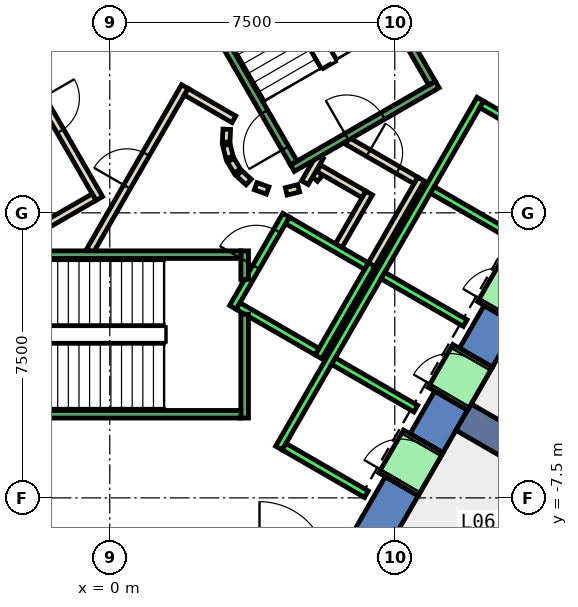
"""IFC4 building model, lengths in metres.
Left out: names, types, materials, properties, quantities, classifications, styles, units other than length and angle.
Written with IfcOpenShell. Run it as: python <this file> out.ifc"""

import sys

from ifc_helpers import new_model, si_unit, direction, frame, frame_2d, origin, place, context, subcontext, project, spatial, polyline, rectangle, outline, extrude, element, fill, save


model = new_model("IFC4")
c1 = context("Model", 3, precision=1e-05, world=origin(), true_north=direction((0.0, 1.0)))
c2 = subcontext(c1, "Body", "Model", "MODEL_VIEW")
j1 = project(units=[si_unit("LENGTHUNIT", "METRE"), si_unit("PLANEANGLEUNIT", "RADIAN")], contexts=[c1])
p1 = place(None, origin())
s1 = spatial("IfcSite", under=j1, at=p1, CompositionType="ELEMENT")
p2 = place(p1, origin())
s2 = spatial("IfcBuilding", under=s1, at=p2, CompositionType="ELEMENT")
p3 = place(p2, frame((0.0, 0.0, 35.0)))
s3 = spatial("IfcBuildingStorey", under=s2, at=p3, CompositionType="ELEMENT", Elevation=35.0)
p4 = place(p3, frame((0.0, 0.0, -0.6)))
e1 = element("IfcWall", 1, at=p4, inside=s3, PredefinedType="SHEAR", context=c2, shape_type="SweptSolid", body=[
    extrude(outline(polyline([(8.517, 11.748), (7.651, 11.248), (12.702, 2.5), (13.856, 2.5), (8.517, 11.748)])), origin(), (0.0, 0.0, 1.0), 4.4),
])
p5 = place(p3, frame((0.0, 0.0, -0.6)))
e2 = element("IfcWall", 2, at=p5, inside=s3, PredefinedType="SHEAR", context=c2, shape_type="SweptSolid", body=[
    extrude(outline(polyline([(8.117, -7.44), (7.252, -6.94), (6.351, -8.5), (6.928, -9.5), (8.117, -7.44)])), origin(), (0.0, 0.0, 1.0), 4.4),
])
p6 = place(p3, frame((0.0, 0.0, -0.6)))
e3 = element("IfcWall", 3, at=p6, inside=s3, PredefinedType="SHEAR", context=c2, shape_type="SweptSolid", body=[
    extrude(outline(polyline([(9.417, -5.189), (8.551, -4.689), (7.902, -5.814), (8.767, -6.314), (9.417, -5.189)])), origin(), (0.0, 0.0, 1.0), 4.4),
])
p7 = place(p3, frame((0.0, 0.0, -0.6)))
e4 = element("IfcWall", 4, at=p7, inside=s3, PredefinedType="SHEAR", context=c2, shape_type="SweptSolid", body=[
    extrude(outline(polyline([(10.717, -2.937), (9.851, -2.437), (9.201, -3.563), (10.067, -4.063), (10.717, -2.937)])), origin(), (0.0, 0.0, 1.0), 4.4),
])
p8 = place(p3, frame((0.0, 0.0, 3.6)))
e5 = element("IfcWall", 5, at=p8, inside=s3, PredefinedType="SHEAR", context=c2, shape_type="SweptSolid", body=[
    extrude(outline(polyline([(8.767, -6.314), (7.902, -5.814), (7.252, -6.94), (8.117, -7.44), (8.767, -6.314)])), origin(), (0.0, 0.0, 1.0), 0.2),
])
p9 = place(p3, frame((0.0, 0.0, 3.6)))
e6 = element("IfcWall", 6, at=p9, inside=s3, PredefinedType="SHEAR", context=c2, shape_type="SweptSolid", body=[
    extrude(outline(polyline([(10.067, -4.063), (9.201, -3.563), (8.551, -4.689), (9.417, -5.189), (10.067, -4.063)])), origin(), (0.0, 0.0, 1.0), 0.2),
])
p10 = place(p3, frame((0.0, 0.0, 3.6)))
e7 = element("IfcWall", 7, at=p10, inside=s3, PredefinedType="SHEAR", context=c2, shape_type="SweptSolid", body=[
    extrude(outline(polyline([(11.367, -1.811), (10.501, -1.311), (9.851, -2.437), (10.717, -2.937), (11.367, -1.811)])), origin(), (0.0, 0.0, 1.0), 0.2),
])
p11 = place(p3, frame((9.31, -5.375, -0.6), z_axis=(0.0, 0.0, 1.0), x_axis=(0.866017533419, -0.500013631625, 0.0)))
e8 = element("IfcWall", 8, at=p11, inside=s3, PredefinedType="SHEAR", context=c2, shape_type="SweptSolid", body=[
    extrude(rectangle(XDim=9.0, YDim=0.8, at=frame_2d((4.5, 0.0))), origin(), (0.0, 0.0, 1.0), 4.4),
])
p12 = place(p3, frame((5.39, 0.898, 0.0), z_axis=(0.0, 0.0, 1.0), x_axis=(0.673828488714, 0.738887791073, 0.0)))
e9 = element("IfcWall", 9, at=p12, inside=s3, PredefinedType="PARTITIONING", context=c2, shape_type="SweptSolid", body=[
    extrude(rectangle(XDim=0.263, YDim=0.2, at=frame_2d((0.131, 0.0))), origin(), (0.0, 0.0, 1.0), 3.8),
])
p13 = place(p3, frame((5.499, 1.172, 0.0), z_axis=(0.0, 0.0, 1.0), x_axis=(0.866333505267, -0.499465972466, 0.0)))
e10 = element("IfcWall", 10, at=p13, inside=s3, PredefinedType="PARTITIONING", context=c2, shape_type="SweptSolid", body=[
    extrude(rectangle(XDim=1.374, YDim=0.2, at=frame_2d((0.687, 0.0))), origin(), (0.0, 0.0, 1.0), 3.8),
])
p14 = place(p3, frame((6.826, 0.522, 0.0), z_axis=(0.0, 0.0, 1.0), x_axis=(-0.500016722714, -0.866015748706, 0.0)))
e11 = element("IfcWall", 11, at=p14, inside=s3, PredefinedType="PARTITIONING", context=c2, shape_type="SweptSolid", body=[
    extrude(rectangle(XDim=1.7, YDim=0.2, at=frame_2d((0.85, 0.0))), origin(), (0.0, 0.0, 1.0), 3.8),
])
p15 = place(p3, frame((6.25, 1.894, 0.0), z_axis=(0.0, 0.0, 1.0), x_axis=(0.866043184279, -0.499969202016, 0.0)))
e12 = element("IfcWall", 12, at=p15, inside=s3, PredefinedType="PARTITIONING", context=c2, shape_type="SweptSolid", body=[
    extrude(rectangle(XDim=2.084, YDim=0.2, at=frame_2d((1.042, 0.0))), origin(), (0.0, 0.0, 1.0), 3.8),
])
p16 = place(p15, frame((0.642, 0.0, 0.0)))
e13 = element("IfcOpeningElement", 13, at=p16, cuts=e12, PredefinedType="OPENING", context=c2, shape_type="SweptSolid", body=[
    extrude(rectangle(XDim=0.9, YDim=2.1, at=frame_2d((0.45, 1.05))), frame((0.0, 0.11, 0.0), z_axis=(0.0, -1.0, 0.0), x_axis=(1.0, 0.0, 0.0)), (0.0, 0.0, 1.0), 0.22),
])
p17 = place(p3, frame((8.192, 0.888, 0.0), z_axis=(0.0, 0.0, 1.0), x_axis=(-0.499940625693, -0.866059680843, 0.0)))
e14 = element("IfcWall", 14, at=p17, inside=s3, PredefinedType="PARTITIONING", context=c2, shape_type="SweptSolid", body=[
    extrude(rectangle(XDim=2.68, YDim=0.2, at=frame_2d((1.34, 0.0))), origin(), (0.0, 0.0, 1.0), 3.8),
])
p18 = place(p3, frame((5.135, 0.793, 0.0), z_axis=(0.0, 0.0, 1.0), x_axis=(0.499526442893, 0.866298639529, 0.0)))
e15 = element("IfcWall", 15, at=p18, inside=s3, PredefinedType="PARTITIONING", context=c2, shape_type="SweptSolid", body=[
    extrude(rectangle(XDim=0.791, YDim=0.2, at=frame_2d((0.396, 0.0))), origin(), (0.0, 0.0, 1.0), 3.8),
])
p19 = place(p3, frame((-0.52, -1.0, 0.0), z_axis=(0.0, 0.0, 1.0), x_axis=(0.50011622646, 0.865958290007, 0.0)))
e16 = element("IfcWall", 16, at=p19, inside=s3, PredefinedType="PARTITIONING", context=c2, shape_type="SweptSolid", body=[
    extrude(rectangle(XDim=4.991, YDim=0.2, at=frame_2d((2.496, 0.0))), origin(), (0.0, 0.0, 1.0), 3.8),
])
p20 = place(p19, frame((1.945, 0.0, 0.0)))
e17 = element("IfcOpeningElement", 17, at=p20, cuts=e16, PredefinedType="OPENING", context=c2, shape_type="SweptSolid", body=[
    extrude(rectangle(XDim=1.0, YDim=2.1, at=frame_2d((0.5, 1.05))), frame((0.0, 0.11, 0.0), z_axis=(0.0, -1.0, 0.0), x_axis=(1.0, 0.0, 0.0)), (0.0, 0.0, 1.0), 0.22),
])
p21 = place(p3, frame((2.012, 3.186, 0.0), z_axis=(0.0, 0.0, 1.0), x_axis=(0.865891012941, -0.500232699559, 0.0)))
e18 = element("IfcWall", 18, at=p21, inside=s3, PredefinedType="PARTITIONING", context=c2, shape_type="SweptSolid", body=[
    extrude(rectangle(XDim=1.449, YDim=0.2, at=frame_2d((0.725, 0.0))), origin(), (0.0, 0.0, 1.0), 3.8),
])
p22 = place(p3, frame((3.079, 2.199, 0.0), z_axis=(0.0, 0.0, 1.0), x_axis=(-0.047771483479, -0.998858290933, 0.0)))
e19 = element("IfcWall", 19, at=p22, inside=s3, PredefinedType="PARTITIONING", context=c2, shape_type="SweptSolid", body=[
    extrude(rectangle(XDim=0.337, YDim=0.2, at=frame_2d((0.169, 0.0))), origin(), (0.0, 0.0, 1.0), 3.8),
])
p23 = place(p3, frame((3.07, 1.786, 0.0), z_axis=(0.0, 0.0, 1.0), x_axis=(0.242705583207, -0.970099994784, 0.0)))
e20 = element("IfcWall", 20, at=p23, inside=s3, PredefinedType="PARTITIONING", context=c2, shape_type="SweptSolid", body=[
    extrude(rectangle(XDim=0.338, YDim=0.2, at=frame_2d((0.169, 0.0))), origin(), (0.0, 0.0, 1.0), 3.8),
])
for number, where, z_axis, x_axis in (
    (21, (3.182, 1.388, 0.0), (0.0, 0.0, 1.0), (0.512, -0.859, 0.0)),
    (22, (3.404, 1.039, 0.0), (0.0, 0.0, 1.0), (0.74, -0.672, 0.0)),
):
    element("IfcWall", number, at=place(p3, frame(where, z_axis=z_axis, x_axis=x_axis)), inside=s3, PredefinedType="PARTITIONING", context=c2, shape_type="SweptSolid", body=[
        extrude(rectangle(XDim=0.338, YDim=0.2, at=frame_2d((0.169, 0.0))), origin(), (0.0, 0.0, 1.0), 3.8),
    ])
p24 = place(p3, frame((3.838, 0.702, 0.0), z_axis=(0.0, 0.0, 1.0), x_axis=(0.941035081519, -0.338308993895, 0.0)))
e23 = element("IfcWall", 23, at=p24, inside=s3, PredefinedType="PARTITIONING", context=c2, shape_type="SweptSolid", body=[
    extrude(rectangle(XDim=0.337, YDim=0.2, at=frame_2d((0.168, 0.0))), origin(), (0.0, 0.0, 1.0), 3.8),
])
p25 = place(p3, frame((4.644, 0.564, 0.0), z_axis=(0.0, 0.0, 1.0), x_axis=(0.969929076366, 0.243387729394, 0.0)))
e24 = element("IfcWall", 24, at=p25, inside=s3, PredefinedType="PARTITIONING", context=c2, shape_type="SweptSolid", body=[
    extrude(rectangle(XDim=0.337, YDim=0.2, at=frame_2d((0.168, 0.0))), origin(), (0.0, 0.0, 1.0), 3.8),
])
p26 = place(p3, frame((-2.771, 4.7, 0.0), z_axis=(0.0, 0.0, 1.0), x_axis=(0.499969479948, -0.866043023828, 0.0)))
e25 = element("IfcWall", 25, at=p26, inside=s3, PredefinedType="PARTITIONING", context=c2, shape_type="SweptSolid", body=[
    extrude(rectangle(XDim=4.99, YDim=0.2, at=frame_2d((2.495, 0.0))), origin(), (0.0, 0.0, 1.0), 3.8),
])
p27 = place(p26, frame((1.945, 0.0, 0.0)))
e26 = element("IfcOpeningElement", 26, at=p27, cuts=e25, PredefinedType="OPENING", context=c2, shape_type="SweptSolid", body=[
    extrude(rectangle(XDim=1.0, YDim=2.1, at=frame_2d((0.5, 1.05))), frame((0.0, 0.11, 0.0), z_axis=(0.0, -1.0, 0.0), x_axis=(1.0, 0.0, 0.0)), (0.0, 0.0, 1.0), 0.22),
])
p28 = place(p3, frame((-0.412, 0.414, 0.0), z_axis=(0.0, 0.0, 1.0), x_axis=(-0.866017369001, -0.500013916395, 0.0)))
e27 = element("IfcWall", 27, at=p28, inside=s3, PredefinedType="PARTITIONING", context=c2, shape_type="SweptSolid", body=[
    extrude(rectangle(XDim=1.45, YDim=0.2, at=frame_2d((0.725, 0.0))), origin(), (0.0, 0.0, 1.0), 3.8),
])
p29 = place(p3, frame((12.401, -7.621, 0.0), z_axis=(0.0, 0.0, 1.0), x_axis=(-0.499983724212, -0.866034800411, 0.0)))
e28 = element("IfcWall", 28, at=p29, inside=s3, PredefinedType="PARTITIONING", context=c2, shape_type="SweptSolid", body=[
    extrude(rectangle(XDim=9.302, YDim=0.2, at=frame_2d((4.651, 0.0))), origin(), (0.0, 0.0, 1.0), 3.8),
])
p30 = place(p29, frame((1.429, 0.0, 0.0)))
e29 = element("IfcOpeningElement", 29, at=p30, cuts=e28, PredefinedType="OPENING", context=c2, shape_type="SweptSolid", body=[
    extrude(rectangle(XDim=1.0, YDim=2.1, at=frame_2d((0.5, 1.05))), frame((0.0, 0.11, 0.0), z_axis=(0.0, -1.0, 0.0), x_axis=(1.0, 0.0, 0.0)), (0.0, 0.0, 1.0), 0.22),
])
p31 = place(p29, frame((2.529, 0.0, 0.0)))
e30 = element("IfcOpeningElement", 30, at=p31, cuts=e28, PredefinedType="OPENING", context=c2, shape_type="SweptSolid", body=[
    extrude(rectangle(XDim=1.0, YDim=2.1, at=frame_2d((0.5, 1.05))), frame((0.0, 0.11, 0.0), z_axis=(0.0, -1.0, 0.0), x_axis=(1.0, 0.0, 0.0)), (0.0, 0.0, 1.0), 0.22),
])
p32 = place(p3, frame((3.24, -2.488, 0.0), z_axis=(0.0, 0.0, 1.0), x_axis=(0.49994636267, 0.866056369097, 0.0)))
e31 = element("IfcWall", 31, at=p32, inside=s3, PredefinedType="STANDARD", context=c2, shape_type="SweptSolid", body=[
    extrude(rectangle(XDim=2.8, YDim=0.2, at=frame_2d((1.4, 0.0))), origin(), (0.0, 0.0, 1.0), 3.8),
])
p33 = place(p32, frame((1.225, 0.0, 0.0)))
e32 = element("IfcOpeningElement", 32, at=p33, cuts=e31, PredefinedType="OPENING", context=c2, shape_type="SweptSolid", body=[
    extrude(rectangle(XDim=1.1, YDim=2.1, at=frame_2d((0.55, 1.05))), frame((0.0, 0.11, 0.0), z_axis=(0.0, -1.0, 0.0), x_axis=(1.0, 0.0, 0.0)), (0.0, 0.0, 1.0), 0.22),
])
p34 = place(p3, frame((5.492, -3.788, 0.0), z_axis=(0.0, 0.0, 1.0), x_axis=(0.500011755427, 0.866018616679, 0.0)))
e33 = element("IfcWall", 33, at=p34, inside=s3, PredefinedType="STANDARD", context=c2, shape_type="SweptSolid", body=[
    extrude(rectangle(XDim=2.8, YDim=0.2, at=frame_2d((1.4, 0.0))), origin(), (0.0, 0.0, 1.0), 3.8),
])
p35 = place(p3, frame((3.377, -2.452, 0.0), z_axis=(0.0, 0.0, 1.0), x_axis=(0.865955154139, -0.50012165622, 0.0)))
e34 = element("IfcWall", 34, at=p35, inside=s3, PredefinedType="STANDARD", context=c2, shape_type="SweptSolid", body=[
    extrude(rectangle(XDim=2.4, YDim=0.2, at=frame_2d((1.2, 0.0))), origin(), (0.0, 0.0, 1.0), 3.8),
])
p36 = place(p3, frame((4.677, -0.2, 0.0), z_axis=(0.0, 0.0, 1.0), x_axis=(0.865973769406, -0.500089422704, 0.0)))
e35 = element("IfcWall", 35, at=p36, inside=s3, PredefinedType="STANDARD", context=c2, shape_type="SweptSolid", body=[
    extrude(rectangle(XDim=2.399, YDim=0.2, at=frame_2d((1.2, 0.0))), origin(), (0.0, 0.0, 1.0), 3.8),
])
p37 = place(p3, frame((4.451, -6.19, 0.0), z_axis=(0.0, 0.0, 1.0), x_axis=(0.50000090737, 0.866024879913, 0.0)))
e36 = element("IfcWall", 36, at=p37, inside=s3, PredefinedType="STANDARD", context=c2, shape_type="SweptSolid", body=[
    extrude(rectangle(XDim=10.6, YDim=0.2, at=frame_2d((5.3, 0.0))), origin(), (0.0, 0.0, 1.0), 3.8),
])
for number, where, z_axis, x_axis in (
    (37, (4.588, -6.153, 0.0), (0.0, 0.0, 1.0), (0.866, -0.5, 0.0)),
    (38, (5.888, -3.902, 0.0), (0.0, 0.0, 1.0), (0.866, -0.5, 0.0)),
    (39, (7.188, -1.65, 0.0), (0.0, 0.0, 1.0), (0.866, -0.5, 0.0)),
    (40, (8.488, 0.602, 0.0), (0.0, 0.0, 1.0), (0.866, -0.5, 0.0)),
):
    element("IfcWall", number, at=place(p3, frame(where, z_axis=z_axis, x_axis=x_axis)), inside=s3, PredefinedType="STANDARD", context=c2, shape_type="SweptSolid", body=[
        extrude(rectangle(XDim=2.5, YDim=0.2, at=frame_2d((1.25, 0.0))), origin(), (0.0, 0.0, 1.0), 3.8),
    ])
p38 = place(p3, frame((9.788, 2.853, 0.0), z_axis=(0.0, 0.0, 1.0), x_axis=(0.865998541277, -0.500046524342, 0.0)))
e41 = element("IfcWall", 41, at=p38, inside=s3, PredefinedType="STANDARD", context=c2, shape_type="SweptSolid", body=[
    extrude(rectangle(XDim=2.5, YDim=0.2, at=frame_2d((1.25, 0.0))), origin(), (0.0, 0.0, 1.0), 3.8),
])
p39 = place(p3, frame((7.598, -7.14, 0.0), z_axis=(0.0, 0.0, 1.0), x_axis=(0.500362116554, 0.865816234728, 0.0)))
e42 = element("IfcWall", 42, at=p39, inside=s3, PredefinedType="STANDARD", context=c2, shape_type="SweptSolid", body=[
    extrude(rectangle(XDim=1.299, YDim=1.2, at=frame_2d((0.65, 0.0))), origin(), (0.0, 0.0, 1.0), 2.4),
])
p40 = place(p39, frame((0.1, 0.0, 0.0)))
e43 = element("IfcOpeningElement", 43, at=p40, cuts=e42, PredefinedType="OPENING", context=c2, shape_type="SweptSolid", body=[
    extrude(rectangle(XDim=1.1, YDim=2.3, at=frame_2d((0.55, 1.15))), frame((0.0, 0.61, 0.0), z_axis=(0.0, -1.0, 0.0), x_axis=(1.0, 0.0, 0.0)), (0.0, 0.0, 1.0), 1.22),
])
p41 = place(p3, frame((8.898, -4.889, 0.0), z_axis=(0.0, 0.0, 1.0), x_axis=(0.500036693733, 0.866004217611, 0.0)))
e44 = element("IfcWall", 44, at=p41, inside=s3, PredefinedType="STANDARD", context=c2, shape_type="SweptSolid", body=[
    extrude(rectangle(XDim=1.3, YDim=1.2, at=frame_2d((0.65, 0.0))), origin(), (0.0, 0.0, 1.0), 2.4),
])
p42 = place(p41, frame((0.1, 0.0, 0.0)))
e45 = element("IfcOpeningElement", 45, at=p42, cuts=e44, PredefinedType="OPENING", context=c2, shape_type="SweptSolid", body=[
    extrude(rectangle(XDim=1.1, YDim=2.3, at=frame_2d((0.55, 1.15))), frame((0.0, 0.61, 0.0), z_axis=(0.0, -1.0, 0.0), x_axis=(1.0, 0.0, 0.0)), (0.0, 0.0, 1.0), 1.22),
])
p43 = place(p3, frame((10.198, -2.637, 0.0), z_axis=(0.0, 0.0, 1.0), x_axis=(0.49989585183, 0.866085525409, 0.0)))
e46 = element("IfcWall", 46, at=p43, inside=s3, PredefinedType="STANDARD", context=c2, shape_type="SweptSolid", body=[
    extrude(rectangle(XDim=1.3, YDim=1.2, at=frame_2d((0.65, 0.0))), origin(), (0.0, 0.0, 1.0), 2.4),
])
p44 = place(p43, frame((0.1, 0.0, 0.0)))
e47 = element("IfcOpeningElement", 47, at=p44, cuts=e46, PredefinedType="OPENING", context=c2, shape_type="SweptSolid", body=[
    extrude(rectangle(XDim=1.1, YDim=2.3, at=frame_2d((0.55, 1.15))), frame((0.0, 0.61, 0.0), z_axis=(0.0, -1.0, 0.0), x_axis=(1.0, 0.0, 0.0)), (0.0, 0.0, 1.0), 1.22),
])
p45 = place(p3, frame((3.55, -2.667, 0.0), z_axis=(0.0, 0.0, 1.0), x_axis=(0.0, -1.0, 0.0)))
e48 = element("IfcWall", 48, at=p45, inside=s3, PredefinedType="STANDARD", context=c2, shape_type="SweptSolid", body=[
    extrude(rectangle(XDim=2.733, YDim=0.2, at=frame_2d((1.366, 0.0))), origin(), (0.0, 0.0, 1.0), 3.8),
])
p46 = place(p3, frame((3.55, -1.0, 0.0), z_axis=(0.0, 0.0, 1.0), x_axis=(0.0, -1.0, 0.0)))
e49 = element("IfcWall", 49, at=p46, inside=s3, PredefinedType="STANDARD", context=c2, shape_type="SweptSolid", body=[
    extrude(rectangle(XDim=0.751, YDim=0.2, at=frame_2d((0.375, 0.0))), origin(), (0.0, 0.0, 1.0), 3.8),
])
p47 = place(p3, frame((-3.45, -1.1, 0.0), z_axis=(0.0, 0.0, 1.0), x_axis=(1.0, 0.0, 0.0)))
e50 = element("IfcWall", 50, at=p47, inside=s3, PredefinedType="STANDARD", context=c2, shape_type="SweptSolid", body=[
    extrude(rectangle(XDim=6.9, YDim=0.2, at=frame_2d((3.45, 0.0))), origin(), (0.0, 0.0, 1.0), 3.8),
])
p48 = place(p47, frame((0.45, 0.0, 0.0)))
e51 = element("IfcOpeningElement", 51, at=p48, cuts=e50, PredefinedType="OPENING", context=c2, shape_type="SweptSolid", body=[
    extrude(rectangle(XDim=1.1, YDim=2.2, at=frame_2d((0.55, 1.1))), frame((0.0, 0.11, 0.0), z_axis=(0.0, -1.0, 0.0), x_axis=(1.0, 0.0, 0.0)), (0.0, 0.0, 1.0), 0.22),
])
p49 = place(p3, frame((-3.45, -5.3, 0.0), z_axis=(0.0, 0.0, 1.0), x_axis=(1.0, 0.0, 0.0)))
e52 = element("IfcWall", 52, at=p49, inside=s3, PredefinedType="STANDARD", context=c2, shape_type="SweptSolid", body=[
    extrude(rectangle(XDim=6.9, YDim=0.2, at=frame_2d((3.45, 0.0))), origin(), (0.0, 0.0, 1.0), 3.8),
])
p50 = place(p3, frame((4.806, 1.176, 0.0), z_axis=(0.0, 0.0, 1.0), x_axis=(0.866059941101, 0.499940174841, 0.0)))
e53 = element("IfcWall", 53, at=p50, inside=s3, PredefinedType="STANDARD", context=c2, shape_type="SweptSolid", body=[
    extrude(rectangle(XDim=4.4, YDim=0.2, at=frame_2d((2.2, 0.0))), origin(), (0.0, 0.0, 1.0), 3.8),
])
p51 = place(p50, frame((1.65, 0.0, 0.0)))
e54 = element("IfcOpeningElement", 54, at=p51, cuts=e53, PredefinedType="OPENING", context=c2, shape_type="SweptSolid", body=[
    extrude(rectangle(XDim=1.1, YDim=2.2, at=frame_2d((0.55, 1.1))), frame((0.0, 0.11, 0.0), z_axis=(0.0, -1.0, 0.0), x_axis=(1.0, 0.0, 0.0)), (0.0, 0.0, 1.0), 0.22),
])
p52 = place(p3, frame((4.843, 1.312, 0.0), z_axis=(0.0, 0.0, 1.0), x_axis=(-0.499963383562, 0.866046543262, 0.0)))
e55 = element("IfcWall", 55, at=p52, inside=s3, PredefinedType="STANDARD", context=c2, shape_type="SweptSolid", body=[
    extrude(rectangle(XDim=6.9, YDim=0.2, at=frame_2d((3.45, 0.0))), origin(), (0.0, 0.0, 1.0), 3.8),
])
p53 = place(p52, frame((0.45, 0.0, 0.0)))
e56 = element("IfcOpeningElement", 56, at=p53, cuts=e55, PredefinedType="OPENING", context=c2, shape_type="SweptSolid", body=[
    extrude(rectangle(XDim=1.1, YDim=2.2, at=frame_2d((0.55, 1.1))), frame((0.0, 0.11, 0.0), z_axis=(0.0, -1.0, 0.0), x_axis=(1.0, 0.0, 0.0)), (0.0, 0.0, 1.0), 0.22),
])
p54 = place(p3, frame((8.48, 3.412, 0.0), z_axis=(0.0, 0.0, 1.0), x_axis=(-0.499978703459, 0.866037698999, 0.0)))
e57 = element("IfcWall", 57, at=p54, inside=s3, PredefinedType="STANDARD", context=c2, shape_type="SweptSolid", body=[
    extrude(rectangle(XDim=6.9, YDim=0.2, at=frame_2d((3.45, 0.0))), origin(), (0.0, 0.0, 1.0), 3.8),
])
p55 = place(p3, frame((-1.393, 7.288, 0.0), z_axis=(0.0, 0.0, 1.0), x_axis=(-0.499963383562, -0.866046543262, 0.0)))
e58 = element("IfcWall", 58, at=p55, inside=s3, PredefinedType="STANDARD", context=c2, shape_type="SweptSolid", body=[
    extrude(rectangle(XDim=6.9, YDim=0.2, at=frame_2d((3.45, 0.0))), origin(), (0.0, 0.0, 1.0), 3.8),
])
p56 = place(p55, frame((0.45, 0.0, 0.0)))
e59 = element("IfcOpeningElement", 59, at=p56, cuts=e58, PredefinedType="OPENING", context=c2, shape_type="SweptSolid", body=[
    extrude(rectangle(XDim=1.1, YDim=2.2, at=frame_2d((0.55, 1.1))), frame((0.0, 0.11, 0.0), z_axis=(0.0, -1.0, 0.0), x_axis=(1.0, 0.0, 0.0)), (0.0, 0.0, 1.0), 0.22),
])
p57 = place(p20, origin())
e60 = element("IfcDoor", 60, at=p57, inside=s3, OperationType="SINGLE_SWING_LEFT", PredefinedType="DOOR", context=c2, shape_type="SweptSolid", body=[
    extrude(rectangle(XDim=1.0, YDim=2.1, at=frame_2d((0.5, 1.05))), frame((0.0, 0.025, 0.0), z_axis=(0.0, -1.0, 0.0), x_axis=(1.0, 0.0, 0.0)), (0.0, 0.0, 1.0), 0.05),
])
fill(e17, e60)
p58 = place(p27, origin())
e61 = element("IfcDoor", 61, at=p58, inside=s3, OperationType="SINGLE_SWING_RIGHT", PredefinedType="DOOR", context=c2, shape_type="SweptSolid", body=[
    extrude(rectangle(XDim=1.0, YDim=2.1, at=frame_2d((0.5, 1.05))), frame((0.0, 0.025, 0.0), z_axis=(0.0, -1.0, 0.0), x_axis=(1.0, 0.0, 0.0)), (0.0, 0.0, 1.0), 0.05),
])
fill(e26, e61)
p59 = place(p16, origin())
e62 = element("IfcDoor", 62, at=p59, inside=s3, OperationType="SINGLE_SWING_LEFT", PredefinedType="DOOR", context=c2, shape_type="SweptSolid", body=[
    extrude(rectangle(XDim=0.9, YDim=2.1, at=frame_2d((0.45, 1.05))), frame((0.0, 0.025, 0.0), z_axis=(0.0, -1.0, 0.0), x_axis=(1.0, 0.0, 0.0)), (0.0, 0.0, 1.0), 0.05),
])
fill(e13, e62)
p60 = place(p40, origin())
e63 = element("IfcDoor", 63, at=p60, inside=s3, OperationType="SLIDING_TO_LEFT", PredefinedType="DOOR", context=c2, shape_type="SweptSolid", body=[
    extrude(rectangle(XDim=1.1, YDim=2.3, at=frame_2d((0.55, 1.15))), frame((0.0, 0.025, 0.0), z_axis=(0.0, -1.0, 0.0), x_axis=(1.0, 0.0, 0.0)), (0.0, 0.0, 1.0), 0.05),
])
fill(e43, e63)
p61 = place(p42, origin())
e64 = element("IfcDoor", 64, at=p61, inside=s3, OperationType="SLIDING_TO_LEFT", PredefinedType="DOOR", context=c2, shape_type="SweptSolid", body=[
    extrude(rectangle(XDim=1.1, YDim=2.3, at=frame_2d((0.55, 1.15))), frame((0.0, 0.025, 0.0), z_axis=(0.0, -1.0, 0.0), x_axis=(1.0, 0.0, 0.0)), (0.0, 0.0, 1.0), 0.05),
])
fill(e45, e64)
p62 = place(p33, origin())
e65 = element("IfcDoor", 65, at=p62, inside=s3, OperationType="SLIDING_TO_LEFT", PredefinedType="DOOR", context=c2, shape_type="SweptSolid", body=[
    extrude(rectangle(XDim=1.1, YDim=2.1, at=frame_2d((0.55, 1.05))), frame((0.0, 0.025, 0.0), z_axis=(0.0, -1.0, 0.0), x_axis=(1.0, 0.0, 0.0)), (0.0, 0.0, 1.0), 0.05),
])
fill(e32, e65)
p63 = place(p53, origin())
e66 = element("IfcDoor", 66, at=p63, inside=s3, OperationType="SINGLE_SWING_LEFT", PredefinedType="DOOR", context=c2, shape_type="SweptSolid", body=[
    extrude(rectangle(XDim=1.1, YDim=2.2, at=frame_2d((0.55, 1.1))), frame((0.0, 0.025, 0.0), z_axis=(0.0, -1.0, 0.0), x_axis=(1.0, 0.0, 0.0)), (0.0, 0.0, 1.0), 0.05),
])
fill(e56, e66)
p64 = place(p51, origin())
e67 = element("IfcDoor", 67, at=p64, inside=s3, OperationType="SINGLE_SWING_LEFT", PredefinedType="DOOR", context=c2, shape_type="SweptSolid", body=[
    extrude(rectangle(XDim=1.1, YDim=2.2, at=frame_2d((0.55, 1.1))), frame((0.0, 0.025, 0.0), z_axis=(0.0, -1.0, 0.0), x_axis=(1.0, 0.0, 0.0)), (0.0, 0.0, 1.0), 0.05),
])
fill(e54, e67)
save(model, sys.argv[1])
